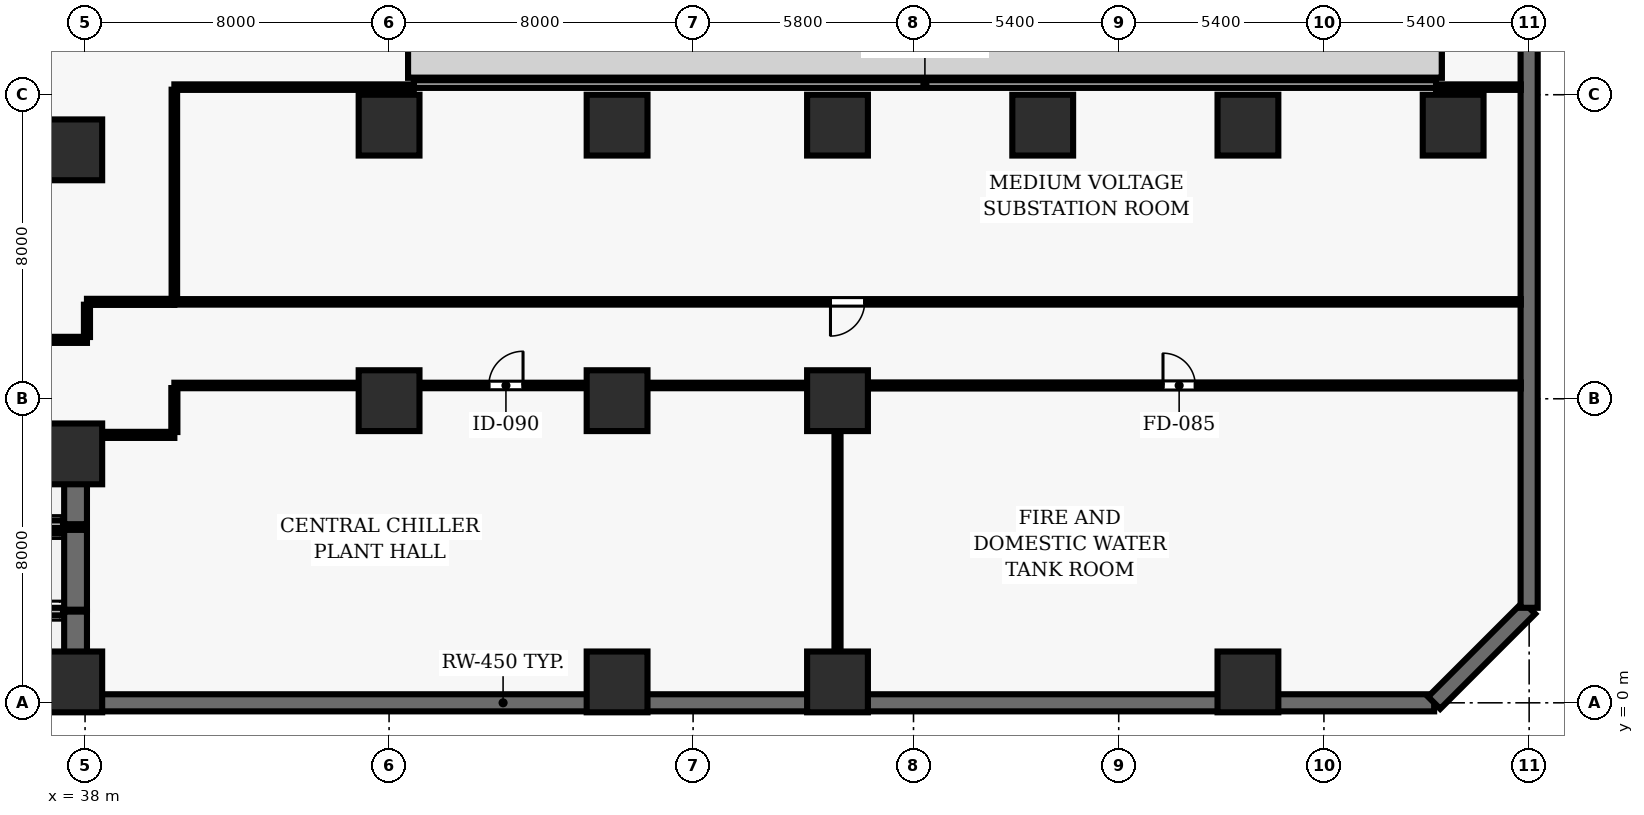
"""IFC4 building model, lengths in metres.
Left out: names, types, materials, properties, quantities, classifications, styles, units other than length and angle.
Written with IfcOpenShell. Run it as: python <this file> out.ifc"""

import sys

from ifc_helpers import new_model, si_unit, direction, frame, frame_2d, origin, origin_2d, place, context, subcontext, project, spatial, rectangle, extrude, element, fill, save


model = new_model("IFC4")
c1 = context("Model", 3, precision=1e-05, world=origin(), true_north=direction((0.0, 1.0)))
c2 = subcontext(c1, "Body", "Model", "MODEL_VIEW")
j1 = project(units=[si_unit("LENGTHUNIT", "METRE"), si_unit("PLANEANGLEUNIT", "RADIAN")], contexts=[c1])
p1 = place(None, origin())
s1 = spatial("IfcSite", under=j1, at=p1, CompositionType="ELEMENT")
p2 = place(p1, origin())
s2 = spatial("IfcBuilding", under=s1, at=p2, CompositionType="ELEMENT")
p3 = place(p2, frame((0.0, 0.0, -9.0)))
s3 = spatial("IfcBuildingStorey", under=s2, at=p3, CompositionType="ELEMENT", Elevation=-9.0)
for number, where, z_axis, x_axis in (
    (1, (37.65, 0.55, 0.0), (0.0, 0.0, 1.0), (1.0, 0.0, 0.0)),
    (2, (37.65, 6.55, 0.0), (0.0, 0.0, 1.0), (1.0, 0.0, 0.0)),
    (3, (37.65, 14.55, 0.0), (0.0, 0.0, 1.0), (1.0, 0.0, 0.0)),
    (4, (46.0, 7.95, 0.0), (0.0, 0.0, 1.0), (1.0, 0.0, 0.0)),
    (5, (46.0, 15.2, 0.0), (0.0, 0.0, 1.0), (1.0, 0.0, 0.0)),
    (6, (52.0, 0.55, 0.0), (0.0, 0.0, 1.0), (1.0, 0.0, 0.0)),
    (7, (52.0, 7.95, 0.0), (0.0, 0.0, 1.0), (1.0, 0.0, 0.0)),
    (8, (52.0, 15.2, 0.0), (0.0, 0.0, 1.0), (1.0, 0.0, 0.0)),
    (9, (57.8, 0.55, 0.0), (0.0, 0.0, 1.0), (1.0, 0.0, 0.0)),
    (10, (57.8, 7.95, 0.0), (0.0, 0.0, 1.0), (1.0, 0.0, 0.0)),
    (11, (57.8, 15.2, 0.0), (0.0, 0.0, 1.0), (1.0, 0.0, 0.0)),
    (12, (63.2, 15.2, 0.0), (0.0, 0.0, 1.0), (1.0, 0.0, 0.0)),
    (13, (68.6, 0.55, 0.0), (0.0, 0.0, 1.0), (1.0, 0.0, 0.0)),
    (14, (68.6, 15.2, 0.0), (0.0, 0.0, 1.0), (1.0, 0.0, 0.0)),
    (15, (74.0, 15.2, 0.0), (0.0, 0.0, 1.0), (1.0, 0.0, 0.0)),
):
    element("IfcColumn", number, at=place(p3, frame(where, z_axis=z_axis, x_axis=x_axis)), inside=s3, PredefinedType="COLUMN", context=c2, shape_type="SweptSolid", body=[
        extrude(rectangle(XDim=1.6, YDim=1.6, at=origin_2d()), origin(), (0.0, 0.0, 1.0), 4.5),
    ])
p4 = place(p3, frame((24.5, 0.0, 0.0), z_axis=(0.0, 0.0, 1.0), x_axis=(1.0, 0.0, 0.0)))
e16 = element("IfcWall", 16, at=p4, inside=s3, PredefinedType="USERDEFINED", context=c2, shape_type="SweptSolid", body=[
    extrude(rectangle(XDim=49.0, YDim=0.45, at=frame_2d((24.5, 0.0))), origin(), (0.0, 0.0, 1.0), 4.22),
])
p5 = place(p3, frame((73.5, 0.0, 0.0), z_axis=(0.0, 0.0, 1.0), x_axis=(0.707106781187, 0.707106781187, 0.0)))
e17 = element("IfcWall", 17, at=p5, inside=s3, PredefinedType="USERDEFINED", context=c2, shape_type="SweptSolid", body=[
    extrude(rectangle(XDim=3.536, YDim=0.45, at=frame_2d((1.768, 0.0))), origin(), (0.0, 0.0, 1.0), 4.22),
])
p6 = place(p3, frame((76.0, 2.5, 0.0), z_axis=(0.0, 0.0, 1.0), x_axis=(0.0, 1.0, 0.0)))
e18 = element("IfcWall", 18, at=p6, inside=s3, PredefinedType="USERDEFINED", context=c2, shape_type="SweptSolid", body=[
    extrude(rectangle(XDim=27.0, YDim=0.45, at=frame_2d((13.5, 0.0))), origin(), (0.0, 0.0, 1.0), 4.22),
])
p7 = place(p3, frame((37.75, 0.3, 0.0), z_axis=(0.0, 0.0, 1.0), x_axis=(0.0, 1.0, 0.0)))
e19 = element("IfcWall", 19, at=p7, inside=s3, PredefinedType="SHEAR", context=c2, shape_type="SweptSolid", body=[
    extrude(rectangle(XDim=2.1, YDim=0.6, at=frame_2d((1.05, 0.0))), origin(), (0.0, 0.0, 1.0), 4.22),
])
for number, where, z_axis, x_axis in (
    (20, (35.28, 0.3, 0.0), (0.0, 0.0, 1.0), (1.0, 0.0, 0.0)),
    (21, (37.42, 2.4, 0.0), (0.0, 0.0, 1.0), (-1.0, 0.0, 0.0)),
):
    element("IfcWall", number, at=place(p3, frame(where, z_axis=z_axis, x_axis=x_axis)), inside=s3, PredefinedType="SOLIDWALL", context=c2, shape_type="SweptSolid", body=[
        extrude(rectangle(XDim=2.14, YDim=0.2, at=frame_2d((1.07, 0.0))), origin(), (0.0, 0.0, 1.0), 4.22),
    ])
p8 = place(p3, frame((37.75, 2.45, 0.0), z_axis=(0.0, 0.0, 1.0), x_axis=(0.0, 1.0, 0.0)))
e22 = element("IfcWall", 22, at=p8, inside=s3, PredefinedType="SHEAR", context=c2, shape_type="SweptSolid", body=[
    extrude(rectangle(XDim=2.1, YDim=0.6, at=frame_2d((1.05, 0.0))), origin(), (0.0, 0.0, 1.0), 4.22),
])
p9 = place(p3, frame((37.42, 4.55, 0.0), z_axis=(0.0, 0.0, 1.0), x_axis=(-1.0, 0.0, 0.0)))
e23 = element("IfcWall", 23, at=p9, inside=s3, PredefinedType="SOLIDWALL", context=c2, shape_type="SweptSolid", body=[
    extrude(rectangle(XDim=2.14, YDim=0.2, at=frame_2d((1.07, 0.0))), origin(), (0.0, 0.0, 1.0), 4.22),
])
p10 = place(p3, frame((37.75, 4.7, 0.0), z_axis=(0.0, 0.0, 1.0), x_axis=(0.0, 1.0, 0.0)))
e24 = element("IfcWall", 24, at=p10, inside=s3, PredefinedType="SHEAR", context=c2, shape_type="SweptSolid", body=[
    extrude(rectangle(XDim=2.25, YDim=0.6, at=frame_2d((1.125, 0.0))), origin(), (0.0, 0.0, 1.0), 4.22),
])
for number, where, z_axis, x_axis in (
    (25, (35.28, 4.7, 0.0), (0.0, 0.0, 1.0), (1.0, 0.0, 0.0)),
    (26, (37.42, 6.95, 0.0), (0.0, 0.0, 1.0), (-1.0, 0.0, 0.0)),
):
    element("IfcWall", number, at=place(p3, frame(where, z_axis=z_axis, x_axis=x_axis)), inside=s3, PredefinedType="SOLIDWALL", context=c2, shape_type="SweptSolid", body=[
        extrude(rectangle(XDim=2.14, YDim=0.2, at=frame_2d((1.07, 0.0))), origin(), (0.0, 0.0, 1.0), 4.22),
    ])
p11 = place(p3, frame((46.65, 16.28, 0.0), z_axis=(0.0, 0.0, 1.0), x_axis=(1.0, 0.0, 0.0)))
e27 = element("IfcWall", 27, at=p11, inside=s3, PredefinedType="SOLIDWALL", context=c2, shape_type="SweptSolid", body=[
    extrude(rectangle(XDim=26.9, YDim=0.2, at=frame_2d((13.45, 0.0))), origin(), (0.0, 0.0, 1.0), 4.22),
])
p12 = place(p3, frame((38.05, 7.05, 0.0), z_axis=(0.0, 0.0, 1.0), x_axis=(1.0, 0.0, 0.0)))
e28 = element("IfcWall", 28, at=p12, inside=s3, PredefinedType="PARTITIONING", context=c2, shape_type="SweptSolid", body=[
    extrude(rectangle(XDim=2.3, YDim=0.16, at=frame_2d((1.15, 0.0))), origin(), (0.0, 0.0, 1.0), 4.22),
])
p13 = place(p3, frame((38.05, 9.55, 0.0), z_axis=(0.0, 0.0, 1.0), x_axis=(-1.0, 0.0, 0.0)))
e29 = element("IfcWall", 29, at=p13, inside=s3, PredefinedType="PARTITIONING", context=c2, shape_type="SweptSolid", body=[
    extrude(rectangle(XDim=2.9, YDim=0.16, at=frame_2d((1.45, 0.0))), origin(), (0.0, 0.0, 1.0), 4.22),
])
p14 = place(p3, frame((40.35, 8.35, 0.0), z_axis=(0.0, 0.0, 1.0), x_axis=(1.0, 0.0, 0.0)))
e30 = element("IfcWall", 30, at=p14, inside=s3, PredefinedType="PARTITIONING", context=c2, shape_type="SweptSolid", body=[
    extrude(rectangle(XDim=17.45, YDim=0.145, at=frame_2d((8.725, 0.0))), origin(), (0.0, 0.0, 1.0), 3.365),
])
p15 = place(p14, frame((8.275, 0.0, 0.0)))
e31 = element("IfcOpeningElement", 31, at=p15, cuts=e30, PredefinedType="OPENING", context=c2, shape_type="SweptSolid", body=[
    extrude(rectangle(XDim=0.9, YDim=2.1, at=frame_2d((0.45, 1.05))), frame((0.0, 0.083, 0.0), z_axis=(0.0, -1.0, 0.0), x_axis=(1.0, 0.0, 0.0)), (0.0, 0.0, 1.0), 0.165),
])
p16 = place(p3, frame((40.35, 10.55, 0.0), z_axis=(0.0, 0.0, 1.0), x_axis=(-1.0, 0.0, 0.0)))
e32 = element("IfcWall", 32, at=p16, inside=s3, PredefinedType="PARTITIONING", context=c2, shape_type="SweptSolid", body=[
    extrude(rectangle(XDim=2.3, YDim=0.16, at=frame_2d((1.15, 0.0))), origin(), (0.0, 0.0, 1.0), 3.751),
])
p17 = place(p3, frame((46.65, 16.2, 0.0), z_axis=(0.0, 0.0, 1.0), x_axis=(-1.0, 0.0, 0.0)))
e33 = element("IfcWall", 33, at=p17, inside=s3, PredefinedType="PARTITIONING", context=c2, shape_type="SweptSolid", body=[
    extrude(rectangle(XDim=6.3, YDim=0.145, at=frame_2d((3.15, 0.0))), origin(), (0.0, 0.0, 1.0), 4.22),
])
p18 = place(p3, frame((57.8, 8.35, 0.0), z_axis=(0.0, 0.0, 1.0), x_axis=(1.0, 0.0, 0.0)))
e34 = element("IfcWall", 34, at=p18, inside=s3, PredefinedType="PARTITIONING", context=c2, shape_type="SweptSolid", body=[
    extrude(rectangle(XDim=17.98, YDim=0.16, at=frame_2d((8.99, 0.0))), origin(), (0.0, 0.0, 1.0), 4.22),
])
p19 = place(p18, frame((8.565, 0.0, 0.0)))
e35 = element("IfcOpeningElement", 35, at=p19, cuts=e34, PredefinedType="OPENING", context=c2, shape_type="SweptSolid", body=[
    extrude(rectangle(XDim=0.85, YDim=2.1, at=frame_2d((0.425, 1.05))), frame((0.0, 0.09, 0.0), z_axis=(0.0, -1.0, 0.0), x_axis=(1.0, 0.0, 0.0)), (0.0, 0.0, 1.0), 0.18),
])
p20 = place(p3, frame((75.78, 10.55, 0.0), z_axis=(0.0, 0.0, 1.0), x_axis=(-1.0, 0.0, 0.0)))
e36 = element("IfcWall", 36, at=p20, inside=s3, PredefinedType="PARTITIONING", context=c2, shape_type="SweptSolid", body=[
    extrude(rectangle(XDim=35.43, YDim=0.145, at=frame_2d((17.715, 0.0))), origin(), (0.0, 0.0, 1.0), 3.751),
])
p21 = place(p20, frame((17.265, 0.0, 0.0)))
e37 = element("IfcOpeningElement", 37, at=p21, cuts=e36, PredefinedType="OPENING", context=c2, shape_type="SweptSolid", body=[
    extrude(rectangle(XDim=0.9, YDim=2.1, at=frame_2d((0.45, 1.05))), frame((0.0, 0.083, 0.0), z_axis=(0.0, -1.0, 0.0), x_axis=(1.0, 0.0, 0.0)), (0.0, 0.0, 1.0), 0.165),
])
p22 = place(p3, frame((75.78, 16.2, 0.0), z_axis=(0.0, 0.0, 1.0), x_axis=(-1.0, 0.0, 0.0)))
e38 = element("IfcWall", 38, at=p22, inside=s3, PredefinedType="PARTITIONING", context=c2, shape_type="SweptSolid", body=[
    extrude(rectangle(XDim=2.23, YDim=0.145, at=frame_2d((1.115, 0.0))), origin(), (0.0, 0.0, 1.0), 4.22),
])
p23 = place(p3, frame((38.05, 10.475, 0.0), z_axis=(0.0, 0.0, 1.0), x_axis=(0.0, -1.0, 0.0)))
e39 = element("IfcWall", 39, at=p23, inside=s3, PredefinedType="PARTITIONING", context=c2, shape_type="SweptSolid", body=[
    extrude(rectangle(XDim=0.85, YDim=0.16, at=frame_2d((0.425, 0.0))), origin(), (0.0, 0.0, 1.0), 3.365),
])
p24 = place(p3, frame((40.35, 7.125, 0.0), z_axis=(0.0, 0.0, 1.0), x_axis=(0.0, 1.0, 0.0)))
e40 = element("IfcWall", 40, at=p24, inside=s3, PredefinedType="PARTITIONING", context=c2, shape_type="SweptSolid", body=[
    extrude(rectangle(XDim=1.157, YDim=0.16, at=frame_2d((0.579, 0.0))), origin(), (0.0, 0.0, 1.0), 4.22),
])
p25 = place(p3, frame((40.35, 16.133, 0.0), z_axis=(0.0, 0.0, 1.0), x_axis=(0.0, -1.0, 0.0)))
e41 = element("IfcWall", 41, at=p25, inside=s3, PredefinedType="PARTITIONING", context=c2, shape_type="SweptSolid", body=[
    extrude(rectangle(XDim=5.508, YDim=0.145, at=frame_2d((2.754, 0.0))), origin(), (0.0, 0.0, 1.0), 3.751),
])
p26 = place(p3, frame((57.8, 0.22, 0.0), z_axis=(0.0, 0.0, 1.0), x_axis=(0.0, 1.0, 0.0)))
e42 = element("IfcWall", 42, at=p26, inside=s3, PredefinedType="PARTITIONING", context=c2, shape_type="SweptSolid", body=[
    extrude(rectangle(XDim=8.055, YDim=0.16, at=frame_2d((4.027, 0.0))), origin(), (0.0, 0.0, 1.0), 3.365),
])
p27 = place(p15, origin())
e43 = element("IfcDoor", 43, at=p27, inside=s3, OperationType="SINGLE_SWING_RIGHT", PredefinedType="DOOR", context=c2, shape_type="SweptSolid", body=[
    extrude(rectangle(XDim=0.9, YDim=2.1, at=frame_2d((0.45, 1.05))), frame((0.0, 0.025, 0.0), z_axis=(0.0, -1.0, 0.0), x_axis=(1.0, 0.0, 0.0)), (0.0, 0.0, 1.0), 0.05),
])
fill(e31, e43)
p28 = place(p19, origin())
e44 = element("IfcDoor", 44, at=p28, inside=s3, OperationType="SINGLE_SWING_LEFT", PredefinedType="DOOR", context=c2, shape_type="SweptSolid", body=[
    extrude(rectangle(XDim=0.85, YDim=2.1, at=frame_2d((0.425, 1.05))), frame((0.0, 0.025, 0.0), z_axis=(0.0, -1.0, 0.0), x_axis=(1.0, 0.0, 0.0)), (0.0, 0.0, 1.0), 0.05),
])
fill(e35, e44)
p29 = place(p21, origin())
e45 = element("IfcDoor", 45, at=p29, inside=s3, OperationType="SINGLE_SWING_RIGHT", PredefinedType="DOOR", context=c2, shape_type="SweptSolid", body=[
    extrude(rectangle(XDim=0.9, YDim=2.1, at=frame_2d((0.45, 1.05))), frame((0.0, 0.025, 0.0), z_axis=(0.0, -1.0, 0.0), x_axis=(1.0, 0.0, 0.0)), (0.0, 0.0, 1.0), 0.05),
])
fill(e37, e45)
save(model, sys.argv[1])
